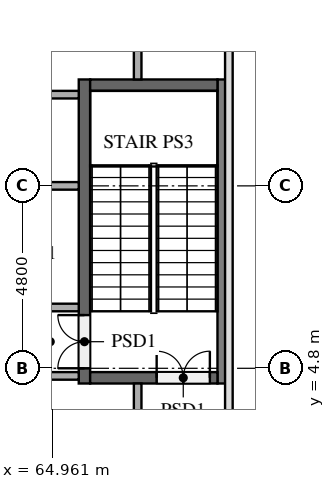
"""IFC4 building model, lengths in metres.
Left out: names, types, materials, properties, quantities, classifications, styles, units other than length and angle.
Written with IfcOpenShell. Run it as: python <this file> out.ifc"""

import sys

from ifc_helpers import new_model, si_unit, direction, frame, frame_2d, origin, place, context, subcontext, project, spatial, rectangle, extrude, element, fill, save


model = new_model("IFC4")
c1 = context("Model", 3, precision=1e-05, world=origin(), true_north=direction((0.0, 1.0)))
c2 = subcontext(c1, "Body", "Model", "MODEL_VIEW")
j1 = project(units=[si_unit("LENGTHUNIT", "METRE"), si_unit("PLANEANGLEUNIT", "RADIAN")], contexts=[c1])
p1 = place(None, origin())
s1 = spatial("IfcSite", under=j1, at=p1, CompositionType="ELEMENT")
p2 = place(p1, origin())
s2 = spatial("IfcBuilding", under=s1, at=p2, CompositionType="ELEMENT")
p3 = place(p2, frame((0.0, 0.0, 10.5)))
s3 = spatial("IfcBuildingStorey", under=s2, at=p3, CompositionType="ELEMENT", Elevation=10.5)
p4 = place(p3, frame((65.8, 4.4, 0.0), z_axis=(0.0, 0.0, 1.0), x_axis=(0.0, 1.0, 0.0)))
e1 = element("IfcWall", 1, at=p4, inside=s3, PredefinedType="SOLIDWALL", context=c2, shape_type="SweptSolid", body=[
    extrude(rectangle(XDim=8.0, YDim=0.3, at=frame_2d((4.0, 0.0))), origin(), (0.0, 0.0, 1.0), 4.2),
])
p5 = place(p4, frame((0.4, 0.0, 0.0)))
e2 = element("IfcOpeningElement", 2, at=p5, cuts=e1, PredefinedType="OPENING", context=c2, shape_type="SweptSolid", body=[
    extrude(rectangle(XDim=1.4, YDim=2.1, at=frame_2d((0.7, 1.05))), frame((0.0, 0.16, 0.0), z_axis=(0.0, -1.0, 0.0), x_axis=(1.0, 0.0, 0.0)), (0.0, 0.0, 1.0), 0.32),
])
p6 = place(p3, frame((69.45, 4.4, 0.0), z_axis=(0.0, 0.0, 1.0), x_axis=(0.0, 1.0, 0.0)))
e3 = element("IfcWall", 3, at=p6, inside=s3, PredefinedType="SOLIDWALL", context=c2, shape_type="SweptSolid", body=[
    extrude(rectangle(XDim=8.0, YDim=0.3, at=frame_2d((4.0, 0.0))), origin(), (0.0, 0.0, 1.0), 4.2),
])
p7 = place(p3, frame((65.95, 4.55, 0.0), z_axis=(0.0, 0.0, 1.0), x_axis=(1.0, 0.0, 0.0)))
e4 = element("IfcWall", 4, at=p7, inside=s3, PredefinedType="SOLIDWALL", context=c2, shape_type="SweptSolid", body=[
    extrude(rectangle(XDim=3.35, YDim=0.3, at=frame_2d((1.675, 0.0))), origin(), (0.0, 0.0, 1.0), 4.2),
])
p8 = place(p7, frame((1.75, 0.0, 0.0)))
e5 = element("IfcOpeningElement", 5, at=p8, cuts=e4, PredefinedType="OPENING", context=c2, shape_type="SweptSolid", body=[
    extrude(rectangle(XDim=1.4, YDim=2.1, at=frame_2d((0.7, 1.05))), frame((0.0, 0.16, 0.0), z_axis=(0.0, -1.0, 0.0), x_axis=(1.0, 0.0, 0.0)), (0.0, 0.0, 1.0), 0.32),
])
p9 = place(p3, frame((65.95, 12.25, 0.0), z_axis=(0.0, 0.0, 1.0), x_axis=(1.0, 0.0, 0.0)))
e6 = element("IfcWall", 6, at=p9, inside=s3, PredefinedType="SOLIDWALL", context=c2, shape_type="SweptSolid", body=[
    extrude(rectangle(XDim=3.35, YDim=0.3, at=frame_2d((1.675, 0.0))), origin(), (0.0, 0.0, 1.0), 4.2),
])
for number, where, z_axis, x_axis in (
    (7, (64.05, 4.6, 0.0), (0.0, 0.0, 1.0), (1.0, 0.0, 0.0)),
    (8, (64.05, 6.4, 0.0), (0.0, 0.0, 1.0), (1.0, 0.0, 0.0)),
):
    element("IfcWall", number, at=place(p3, frame(where, z_axis=z_axis, x_axis=x_axis)), inside=s3, PredefinedType="PARTITIONING", context=c2, shape_type="SweptSolid", body=[
        extrude(rectangle(XDim=1.6, YDim=0.2, at=frame_2d((0.8, 0.0))), origin(), (0.0, 0.0, 1.0), 4.2),
    ])
p10 = place(p3, frame((65.65, 9.6, 0.0), z_axis=(0.0, 0.0, 1.0), x_axis=(-1.0, 0.0, 0.0)))
e9 = element("IfcWall", 9, at=p10, inside=s3, PredefinedType="PARTITIONING", context=c2, shape_type="SweptSolid", body=[
    extrude(rectangle(XDim=32.75, YDim=0.2, at=frame_2d((16.375, 0.0))), origin(), (0.0, 0.0, 1.0), 4.2),
])
p11 = place(p10, frame((23.1, 0.0, 0.0)))
e10 = element("IfcOpeningElement", 10, at=p11, cuts=e9, PredefinedType="OPENING", context=c2, shape_type="SweptSolid", body=[
    extrude(rectangle(XDim=1.0, YDim=2.1, at=frame_2d((0.5, 1.05))), frame((0.0, 0.11, 0.0), z_axis=(0.0, -1.0, 0.0), x_axis=(1.0, 0.0, 0.0)), (0.0, 0.0, 1.0), 0.22),
])
p12 = place(p3, frame((52.7, 12.0, 0.0), z_axis=(0.0, 0.0, 1.0), x_axis=(1.0, 0.0, 0.0)))
e11 = element("IfcWall", 11, at=p12, inside=s3, PredefinedType="PARTITIONING", context=c2, shape_type="SweptSolid", body=[
    extrude(rectangle(XDim=12.95, YDim=0.2, at=frame_2d((6.475, 0.0))), origin(), (0.0, 0.0, 1.0), 4.2),
])
p13 = place(p3, frame((67.2, 0.1, 0.0), z_axis=(0.0, 0.0, 1.0), x_axis=(0.0, 1.0, 0.0)))
e12 = element("IfcWall", 12, at=p13, inside=s3, PredefinedType="PARTITIONING", context=c2, shape_type="SweptSolid", body=[
    extrude(rectangle(XDim=4.3, YDim=0.2, at=frame_2d((2.15, 0.0))), origin(), (0.0, 0.0, 1.0), 4.2),
])
p14 = place(p13, frame((1.65, 0.0, 0.0)))
e13 = element("IfcOpeningElement", 13, at=p14, cuts=e12, PredefinedType="OPENING", context=c2, shape_type="SweptSolid", body=[
    extrude(rectangle(XDim=1.0, YDim=2.1, at=frame_2d((0.5, 1.05))), frame((0.0, 0.11, 0.0), z_axis=(0.0, -1.0, 0.0), x_axis=(1.0, 0.0, 0.0)), (0.0, 0.0, 1.0), 0.22),
])
p15 = place(p3, frame((67.2, 12.4, 0.0), z_axis=(0.0, 0.0, 1.0), x_axis=(0.0, 1.0, 0.0)))
e14 = element("IfcWall", 14, at=p15, inside=s3, PredefinedType="PARTITIONING", context=c2, shape_type="SweptSolid", body=[
    extrude(rectangle(XDim=28.3, YDim=0.2, at=frame_2d((14.15, 0.0))), origin(), (0.0, 0.0, 1.0), 4.2),
])
p16 = place(p15, frame((23.05, 0.0, 0.0)))
e15 = element("IfcOpeningElement", 15, at=p16, cuts=e14, PredefinedType="OPENING", context=c2, shape_type="SweptSolid", body=[
    extrude(rectangle(XDim=1.0, YDim=2.1, at=frame_2d((0.5, 1.05))), frame((0.0, 0.11, 0.0), z_axis=(0.0, -1.0, 0.0), x_axis=(1.0, 0.0, 0.0)), (0.0, 0.0, 1.0), 0.22),
])
p17 = place(p5, frame((1.4, 0.0, 0.0), z_axis=(0.0, 0.0, 1.0), x_axis=(-1.0, 0.0, 0.0)))
e16 = element("IfcDoor", 16, at=p17, inside=s3, OperationType="DOUBLE_DOOR_SINGLE_SWING", PredefinedType="DOOR", context=c2, shape_type="SweptSolid", body=[
    extrude(rectangle(XDim=1.4, YDim=2.1, at=frame_2d((0.7, 1.05))), frame((0.0, 0.025, 0.0), z_axis=(0.0, -1.0, 0.0), x_axis=(1.0, 0.0, 0.0)), (0.0, 0.0, 1.0), 0.05),
])
fill(e2, e16)
p18 = place(p8, origin())
e17 = element("IfcDoor", 17, at=p18, inside=s3, OperationType="DOUBLE_DOOR_SINGLE_SWING", PredefinedType="DOOR", context=c2, shape_type="SweptSolid", body=[
    extrude(rectangle(XDim=1.4, YDim=2.1, at=frame_2d((0.7, 1.05))), frame((0.0, 0.025, 0.0), z_axis=(0.0, -1.0, 0.0), x_axis=(1.0, 0.0, 0.0)), (0.0, 0.0, 1.0), 0.05),
])
fill(e5, e17)
save(model, sys.argv[1])
